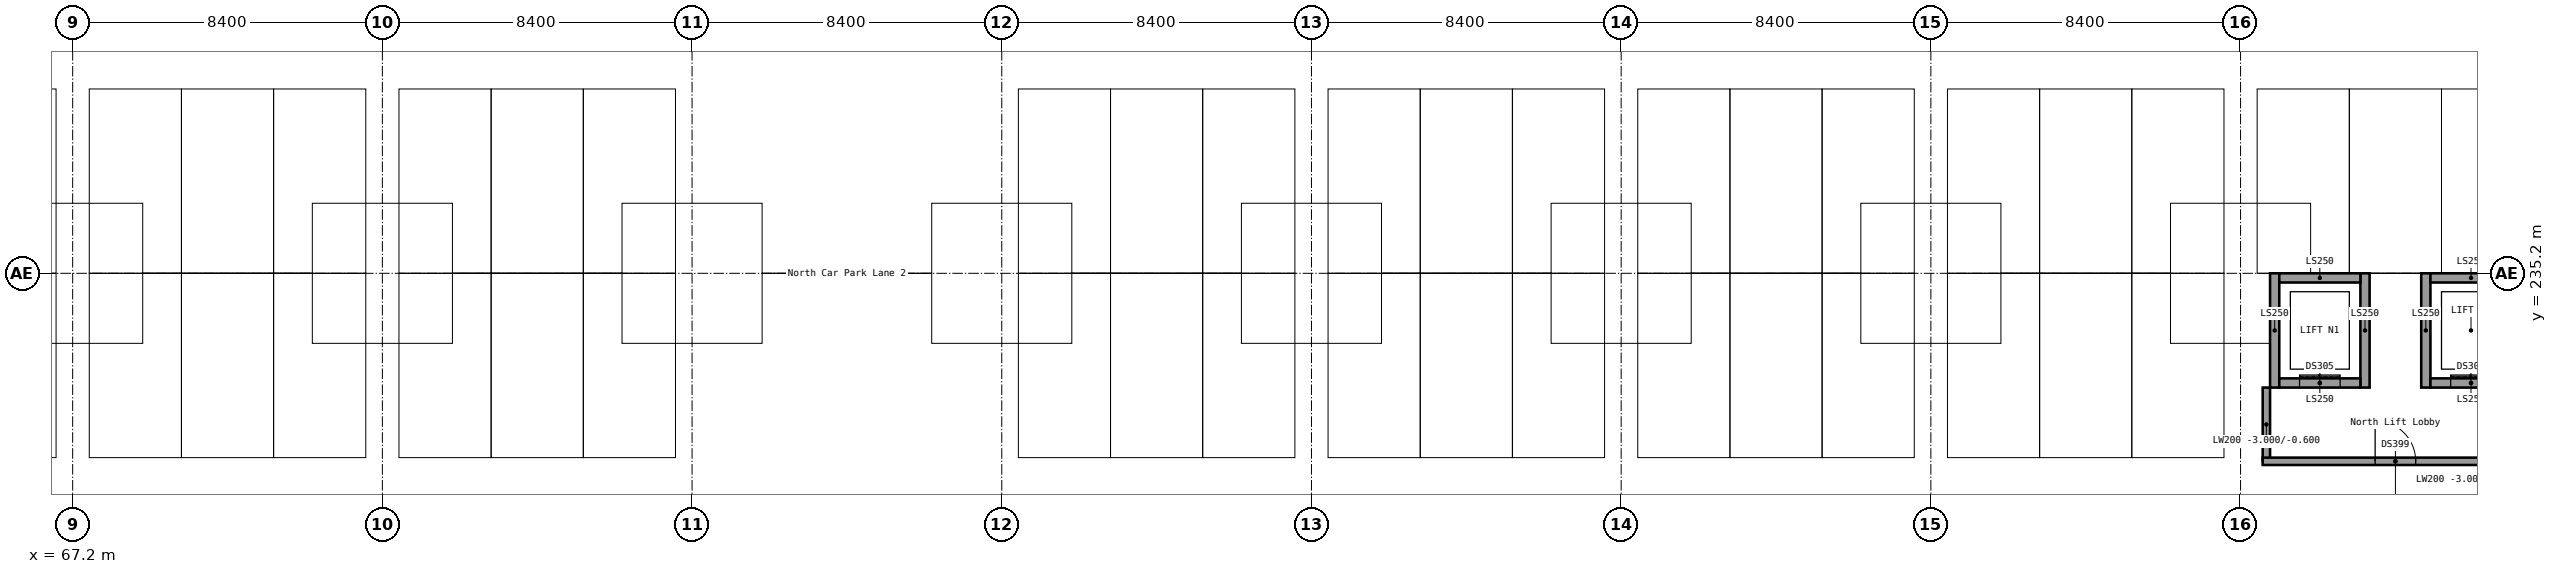
"""IFC4 building model, lengths in metres.
Left out: names, types, materials, properties, quantities, classifications, styles, units other than length and angle.
Written with IfcOpenShell. Run it as: python <this file> out.ifc"""

import sys

from ifc_helpers import new_model, si_unit, direction, frame, frame_2d, origin, origin_2d, place, context, subcontext, project, spatial, rectangle, extrude, element, fill, save


model = new_model("IFC4")
c1 = context("Model", 3, precision=1e-05, world=origin(), true_north=direction((0.0, 1.0)))
c2 = subcontext(c1, "Body", "Model", "MODEL_VIEW")
j1 = project(units=[si_unit("LENGTHUNIT", "METRE"), si_unit("PLANEANGLEUNIT", "RADIAN")], contexts=[c1])
p1 = place(None, origin())
s1 = spatial("IfcSite", under=j1, at=p1, CompositionType="ELEMENT")
p2 = place(p1, origin())
s2 = spatial("IfcBuilding", under=s1, at=p2, CompositionType="ELEMENT")
p3 = place(p2, frame((0.0, 0.0, -3.0)))
s3 = spatial("IfcBuildingStorey", under=s2, at=p3, CompositionType="ELEMENT", Elevation=-3.0)
for number, where, z_axis, x_axis in (
    (1, (126.925, 232.1, -1.5), (0.0, 0.0, 1.0), (0.0, 1.0, 0.0)),
    (2, (129.375, 232.1, -1.5), (0.0, 0.0, 1.0), (0.0, 1.0, 0.0)),
):
    element("IfcWall", number, at=place(p3, frame(where, z_axis=z_axis, x_axis=x_axis)), inside=s3, PredefinedType="SHEAR", context=c2, shape_type="SweptSolid", body=[
        extrude(rectangle(XDim=3.1, YDim=0.25, at=frame_2d((1.55, 0.0))), origin(), (0.0, 0.0, 1.0), 4.5),
    ])
p4 = place(p3, frame((127.05, 232.225, -1.5), z_axis=(0.0, 0.0, 1.0), x_axis=(1.0, 0.0, 0.0)))
e3 = element("IfcWall", 3, at=p4, inside=s3, PredefinedType="SHEAR", context=c2, shape_type="SweptSolid", body=[
    extrude(rectangle(XDim=2.2, YDim=0.25, at=frame_2d((1.1, 0.0))), origin(), (0.0, 0.0, 1.0), 4.5),
])
p5 = place(p4, frame((0.55, 0.0, 1.5)))
e4 = element("IfcOpeningElement", 4, at=p5, cuts=e3, PredefinedType="OPENING", context=c2, shape_type="SweptSolid", body=[
    extrude(rectangle(XDim=1.1, YDim=2.1, at=frame_2d((0.55, 1.05))), frame((0.0, 0.125, 0.0), z_axis=(0.0, -1.0, 0.0), x_axis=(1.0, 0.0, 0.0)), (0.0, 0.0, 1.0), 0.25),
])
p6 = place(p3, frame((127.05, 235.075, -1.5), z_axis=(0.0, 0.0, 1.0), x_axis=(1.0, 0.0, 0.0)))
e5 = element("IfcWall", 5, at=p6, inside=s3, PredefinedType="SHEAR", context=c2, shape_type="SweptSolid", body=[
    extrude(rectangle(XDim=2.2, YDim=0.25, at=frame_2d((1.1, 0.0))), origin(), (0.0, 0.0, 1.0), 4.5),
])
p7 = place(p3, frame((131.025, 232.1, -1.5), z_axis=(0.0, 0.0, 1.0), x_axis=(0.0, 1.0, 0.0)))
e6 = element("IfcWall", 6, at=p7, inside=s3, PredefinedType="SHEAR", context=c2, shape_type="SweptSolid", body=[
    extrude(rectangle(XDim=3.1, YDim=0.25, at=frame_2d((1.55, 0.0))), origin(), (0.0, 0.0, 1.0), 4.5),
])
p8 = place(p3, frame((131.15, 232.225, -1.5), z_axis=(0.0, 0.0, 1.0), x_axis=(1.0, 0.0, 0.0)))
e7 = element("IfcWall", 7, at=p8, inside=s3, PredefinedType="SHEAR", context=c2, shape_type="SweptSolid", body=[
    extrude(rectangle(XDim=2.2, YDim=0.25, at=frame_2d((1.1, 0.0))), origin(), (0.0, 0.0, 1.0), 4.5),
])
p9 = place(p8, frame((0.55, 0.0, 1.5)))
e8 = element("IfcOpeningElement", 8, at=p9, cuts=e7, PredefinedType="OPENING", context=c2, shape_type="SweptSolid", body=[
    extrude(rectangle(XDim=1.1, YDim=2.1, at=frame_2d((0.55, 1.05))), frame((0.0, 0.125, 0.0), z_axis=(0.0, -1.0, 0.0), x_axis=(1.0, 0.0, 0.0)), (0.0, 0.0, 1.0), 0.25),
])
p10 = place(p3, frame((131.15, 235.075, -1.5), z_axis=(0.0, 0.0, 1.0), x_axis=(1.0, 0.0, 0.0)))
e9 = element("IfcWall", 9, at=p10, inside=s3, PredefinedType="SHEAR", context=c2, shape_type="SweptSolid", body=[
    extrude(rectangle(XDim=2.2, YDim=0.25, at=frame_2d((1.1, 0.0))), origin(), (0.0, 0.0, 1.0), 4.5),
])
for number, where, z_axis, x_axis in (
    (10, (67.2, 235.2, 0.0), (0.0, 0.0, 1.0), (1.0, 0.0, 0.0)),
    (11, (75.6, 235.2, 0.0), (0.0, 0.0, 1.0), (1.0, 0.0, 0.0)),
    (12, (84.0, 235.2, 0.0), (0.0, 0.0, 1.0), (1.0, 0.0, 0.0)),
    (13, (92.4, 235.2, 0.0), (0.0, 0.0, 1.0), (1.0, 0.0, 0.0)),
    (14, (100.8, 235.2, 0.0), (0.0, 0.0, 1.0), (1.0, 0.0, 0.0)),
    (15, (109.2, 235.2, 0.0), (0.0, 0.0, 1.0), (1.0, 0.0, 0.0)),
    (16, (117.6, 235.2, 0.0), (0.0, 0.0, 1.0), (1.0, 0.0, 0.0)),
    (17, (126.0, 235.2, 0.0), (0.0, 0.0, 1.0), (1.0, 0.0, 0.0)),
):
    element("IfcColumn", number, at=place(p3, frame(where, z_axis=z_axis, x_axis=x_axis)), inside=s3, PredefinedType="COLUMN", context=c2, shape_type="SweptSolid", body=[
        extrude(rectangle(XDim=0.8, YDim=0.8, at=origin_2d()), origin(), (0.0, 0.0, 1.0), 2.4),
    ])
p11 = place(p3, frame((126.7, 230.1, 0.0), z_axis=(0.0, 0.0, 1.0), x_axis=(0.0, 1.0, 0.0)))
e18 = element("IfcWall", 18, at=p11, inside=s3, PredefinedType="PARTITIONING", context=c2, shape_type="SweptSolid", body=[
    extrude(rectangle(XDim=2.0, YDim=0.2, at=frame_2d((1.0, 0.0))), origin(), (0.0, 0.0, 1.0), 2.4),
])
p12 = place(p3, frame((126.6, 230.1, 0.0), z_axis=(0.0, 0.0, 1.0), x_axis=(1.0, 0.0, 0.0)))
e19 = element("IfcWall", 19, at=p12, inside=s3, PredefinedType="PARTITIONING", context=c2, shape_type="SweptSolid", body=[
    extrude(rectangle(XDim=7.2, YDim=0.2, at=frame_2d((3.6, 0.0))), origin(), (0.0, 0.0, 1.0), 2.4),
])
p13 = place(p12, frame((3.05, 0.0, 0.0)))
e20 = element("IfcOpeningElement", 20, at=p13, cuts=e19, PredefinedType="OPENING", context=c2, shape_type="SweptSolid", body=[
    extrude(rectangle(XDim=1.1, YDim=2.1, at=frame_2d((0.55, 1.05))), frame((0.0, 0.1, 0.0), z_axis=(0.0, -1.0, 0.0), x_axis=(1.0, 0.0, 0.0)), (0.0, 0.0, 1.0), 0.2),
])
p14 = place(p5, origin())
e21 = element("IfcDoor", 21, at=p14, inside=s3, OperationType="DOUBLE_DOOR_SLIDING", PredefinedType="DOOR", context=c2, shape_type="SweptSolid", body=[
    extrude(rectangle(XDim=1.1, YDim=2.1, at=frame_2d((0.55, 1.05))), frame((0.0, 0.025, 0.0), z_axis=(0.0, -1.0, 0.0), x_axis=(1.0, 0.0, 0.0)), (0.0, 0.0, 1.0), 0.05),
])
fill(e4, e21)
p15 = place(p9, origin())
e22 = element("IfcDoor", 22, at=p15, inside=s3, OperationType="DOUBLE_DOOR_SLIDING", PredefinedType="DOOR", context=c2, shape_type="SweptSolid", body=[
    extrude(rectangle(XDim=1.1, YDim=2.1, at=frame_2d((0.55, 1.05))), frame((0.0, 0.025, 0.0), z_axis=(0.0, -1.0, 0.0), x_axis=(1.0, 0.0, 0.0)), (0.0, 0.0, 1.0), 0.05),
])
fill(e8, e22)
p16 = place(p13, origin())
e23 = element("IfcDoor", 23, at=p16, inside=s3, OperationType="SINGLE_SWING_LEFT", PredefinedType="DOOR", context=c2, shape_type="SweptSolid", body=[
    extrude(rectangle(XDim=1.1, YDim=2.1, at=frame_2d((0.55, 1.05))), frame((0.0, 0.025, 0.0), z_axis=(0.0, -1.0, 0.0), x_axis=(1.0, 0.0, 0.0)), (0.0, 0.0, 1.0), 0.05),
])
fill(e20, e23)
save(model, sys.argv[1])
